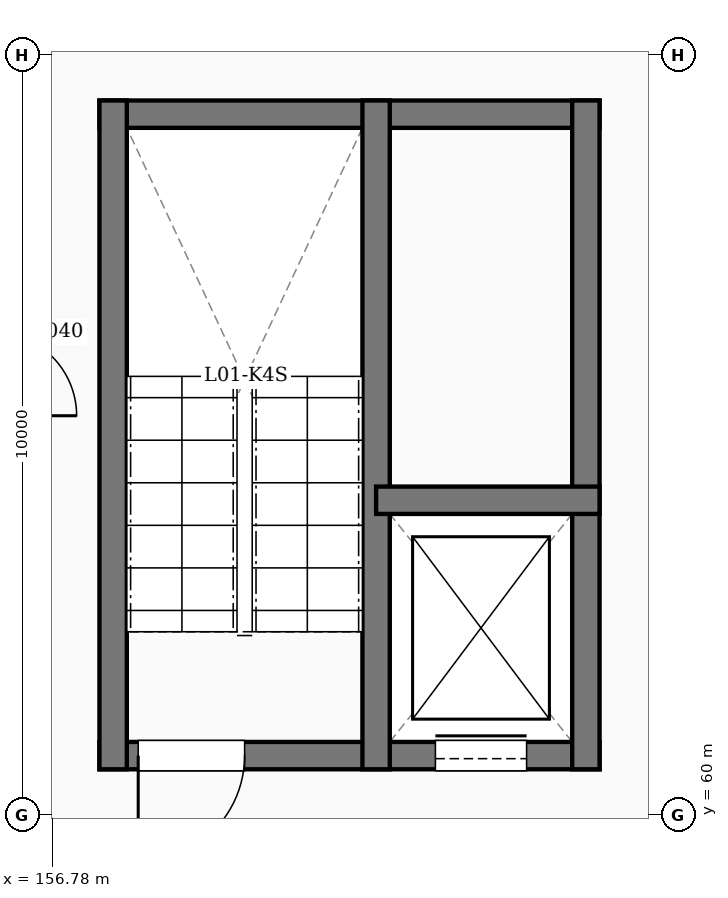
"""IFC4 building model, lengths in metres.
Left out: names, types, materials, properties, quantities, classifications, styles, units other than length and angle.
Written with IfcOpenShell. Run it as: python <this file> out.ifc"""

import sys

from ifc_helpers import new_model, si_unit, direction, frame, frame_2d, origin, place, context, subcontext, project, spatial, rectangle, extrude, element, fill, save


model = new_model("IFC4")
c1 = context("Model", 3, precision=1e-05, world=origin(), true_north=direction((0.0, 1.0)))
c2 = subcontext(c1, "Body", "Model", "MODEL_VIEW")
j1 = project(units=[si_unit("LENGTHUNIT", "METRE"), si_unit("PLANEANGLEUNIT", "RADIAN")], contexts=[c1])
p1 = place(None, origin())
s1 = spatial("IfcSite", under=j1, at=p1, CompositionType="ELEMENT")
p2 = place(p1, origin())
s2 = spatial("IfcBuilding", under=s1, at=p2, CompositionType="ELEMENT")
p3 = place(p2, frame((0.0, 0.0, 5.4)))
s3 = spatial("IfcBuildingStorey", under=s2, at=p3, CompositionType="ELEMENT", Elevation=5.4)
p4 = place(p3, frame((157.4, 60.78, 0.0), z_axis=(0.0, 0.0, 1.0), x_axis=(1.0, 0.0, 0.0)))
e1 = element("IfcWall", 1, at=p4, inside=s3, PredefinedType="SHEAR", context=c2, shape_type="SweptSolid", body=[
    extrude(rectangle(XDim=6.58, YDim=0.36, at=frame_2d((3.29, 0.0))), origin(), (0.0, 0.0, 1.0), 4.8),
])
p5 = place(p4, frame((0.51, 0.0, 0.0)))
e2 = element("IfcOpeningElement", 2, at=p5, cuts=e1, PredefinedType="OPENING", context=c2, shape_type="SweptSolid", body=[
    extrude(rectangle(XDim=1.4, YDim=2.35, at=frame_2d((0.7, 1.175))), frame((0.0, 0.19, 0.0), z_axis=(0.0, -1.0, 0.0), x_axis=(1.0, 0.0, 0.0)), (0.0, 0.0, 1.0), 0.38),
])
p6 = place(p4, frame((4.42, 0.0, 0.0)))
e3 = element("IfcOpeningElement", 3, at=p6, cuts=e1, PredefinedType="OPENING", context=c2, shape_type="SweptSolid", body=[
    extrude(rectangle(XDim=1.2, YDim=2.35, at=frame_2d((0.6, 1.175))), frame((0.0, 0.19, 0.0), z_axis=(0.0, -1.0, 0.0), x_axis=(1.0, 0.0, 0.0)), (0.0, 0.0, 1.0), 0.38),
])
p7 = place(p3, frame((157.4, 69.22, 0.0), z_axis=(0.0, 0.0, 1.0), x_axis=(1.0, 0.0, 0.0)))
e4 = element("IfcWall", 4, at=p7, inside=s3, PredefinedType="SHEAR", context=c2, shape_type="SweptSolid", body=[
    extrude(rectangle(XDim=6.58, YDim=0.36, at=frame_2d((3.29, 0.0))), origin(), (0.0, 0.0, 1.0), 4.8),
])
for number, where, z_axis, x_axis in (
    (5, (157.58, 60.6, 0.0), (0.0, 0.0, 1.0), (0.0, 1.0, 0.0)),
    (6, (163.8, 60.6, 0.0), (0.0, 0.0, 1.0), (0.0, 1.0, 0.0)),
    (7, (161.04, 60.6, 0.0), (0.0, 0.0, 1.0), (0.0, 1.0, 0.0)),
):
    element("IfcWall", number, at=place(p3, frame(where, z_axis=z_axis, x_axis=x_axis)), inside=s3, PredefinedType="SHEAR", context=c2, shape_type="SweptSolid", body=[
        extrude(rectangle(XDim=8.8, YDim=0.36, at=frame_2d((4.4, 0.0))), origin(), (0.0, 0.0, 1.0), 4.8),
    ])
p8 = place(p3, frame((161.04, 64.14, 0.0), z_axis=(0.0, 0.0, 1.0), x_axis=(1.0, 0.0, 0.0)))
e8 = element("IfcWall", 8, at=p8, inside=s3, PredefinedType="SHEAR", context=c2, shape_type="SweptSolid", body=[
    extrude(rectangle(XDim=2.94, YDim=0.36, at=frame_2d((1.47, 0.0))), origin(), (0.0, 0.0, 1.0), 4.8),
])
p9 = place(p5, origin())
e9 = element("IfcDoor", 9, at=p9, inside=s3, OperationType="SINGLE_SWING_LEFT", PredefinedType="DOOR", context=c2, shape_type="SweptSolid", body=[
    extrude(rectangle(XDim=1.4, YDim=2.35, at=frame_2d((0.7, 1.175))), frame((0.0, 0.025, 0.0), z_axis=(0.0, -1.0, 0.0), x_axis=(1.0, 0.0, 0.0)), (0.0, 0.0, 1.0), 0.05),
])
fill(e2, e9)
p10 = place(p6, origin())
e10 = element("IfcDoor", 10, at=p10, inside=s3, OperationType="SLIDING_TO_LEFT", PredefinedType="DOOR", context=c2, shape_type="SweptSolid", body=[
    extrude(rectangle(XDim=1.2, YDim=2.35, at=frame_2d((0.6, 1.175))), frame((0.0, 0.025, 0.0), z_axis=(0.0, -1.0, 0.0), x_axis=(1.0, 0.0, 0.0)), (0.0, 0.0, 1.0), 0.05),
])
fill(e3, e10)
save(model, sys.argv[1])
